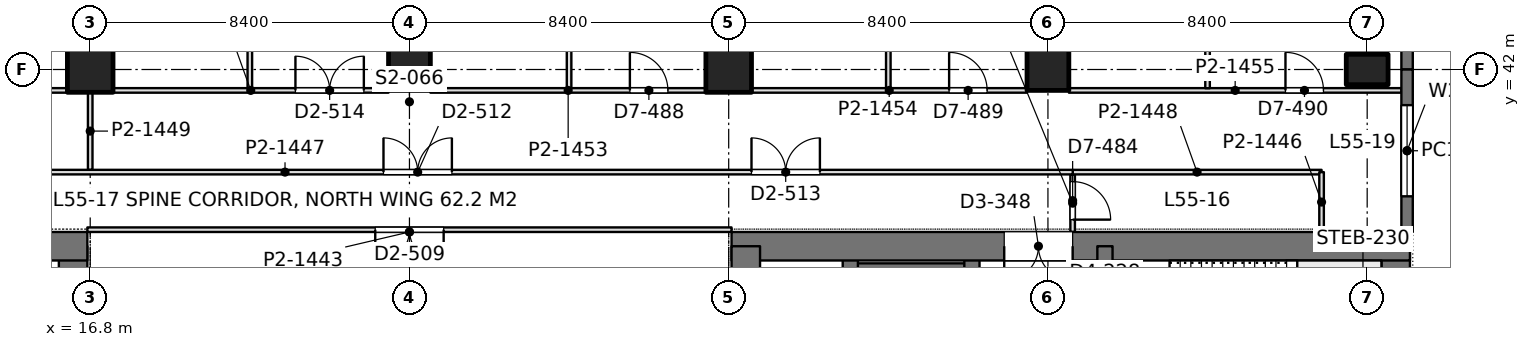
"""IFC4 building model, lengths in metres.
Left out: names, types, materials, properties, quantities, classifications, styles, units other than length and angle.
Written with IfcOpenShell. Run it as: python <this file> out.ifc"""

import sys

from ifc_helpers import new_model, si_unit, direction, frame, frame_2d, origin, origin_2d, place, context, subcontext, project, spatial, rectangle, extrude, element, fill, save


model = new_model("IFC4")
c1 = context("Model", 3, precision=1e-05, world=origin(), true_north=direction((0.0, 1.0)))
c2 = subcontext(c1, "Body", "Model", "MODEL_VIEW")
j1 = project(units=[si_unit("LENGTHUNIT", "METRE"), si_unit("PLANEANGLEUNIT", "RADIAN")], contexts=[c1])
p1 = place(None, origin())
s1 = spatial("IfcSite", under=j1, at=p1, CompositionType="ELEMENT")
p2 = place(p1, origin())
s2 = spatial("IfcBuilding", under=s1, at=p2, CompositionType="ELEMENT")
p3 = place(p2, frame((0.0, 0.0, 240.6)))
s3 = spatial("IfcBuildingStorey", under=s2, at=p3, CompositionType="ELEMENT", Elevation=240.6)
p4 = place(p3, frame((16.8, 42.0, 0.0), z_axis=(0.0, 0.0, 1.0), x_axis=(1.0, 0.0, 0.0)))
e1 = element("IfcColumn", 1, at=p4, inside=s3, PredefinedType="COLUMN", context=c2, shape_type="SweptSolid", body=[
    extrude(rectangle(XDim=1.2, YDim=1.2, at=origin_2d()), origin(), (0.0, 0.0, 1.0), 4.2),
])
p5 = place(p3, frame((25.2, 42.0, 0.0), z_axis=(0.0, 0.0, 1.0), x_axis=(1.0, 0.0, 0.0)))
e2 = element("IfcColumn", 2, at=p5, inside=s3, PredefinedType="COLUMN", context=c2, shape_type="SweptSolid", body=[
    extrude(rectangle(XDim=1.1, YDim=1.1, at=origin_2d()), origin(), (0.0, 0.0, 1.0), 4.2),
])
p6 = place(p3, frame((33.6, 42.0, 0.0), z_axis=(0.0, 0.0, 1.0), x_axis=(1.0, 0.0, 0.0)))
e3 = element("IfcColumn", 3, at=p6, inside=s3, PredefinedType="COLUMN", context=c2, shape_type="SweptSolid", body=[
    extrude(rectangle(XDim=1.2, YDim=1.2, at=origin_2d()), origin(), (0.0, 0.0, 1.0), 4.2),
])
p7 = place(p3, frame((42.0, 42.0, 0.0), z_axis=(0.0, 0.0, 1.0), x_axis=(1.0, 0.0, 0.0)))
e4 = element("IfcColumn", 4, at=p7, inside=s3, PredefinedType="COLUMN", context=c2, shape_type="SweptSolid", body=[
    extrude(rectangle(XDim=1.1, YDim=1.1, at=origin_2d()), origin(), (0.0, 0.0, 1.0), 4.2),
])
p8 = place(p3, frame((50.4, 42.0, 0.0), z_axis=(0.0, 0.0, 1.0), x_axis=(0.0, 1.0, 0.0)))
e5 = element("IfcColumn", 5, at=p8, inside=s3, PredefinedType="COLUMN", context=c2, shape_type="SweptSolid", body=[
    extrude(rectangle(XDim=0.8, YDim=1.1, at=origin_2d()), origin(), (0.0, 0.0, 1.0), 4.2),
])
p9 = place(p3, frame((-1.125, 37.35, 0.0), z_axis=(0.0, 0.0, 1.0), x_axis=(1.0, 0.0, 0.0)))
e6 = element("IfcWall", 6, at=p9, inside=s3, PredefinedType="SHEAR", context=c2, shape_type="SweptSolid", body=[
    extrude(rectangle(XDim=17.85, YDim=0.75, at=frame_2d((8.925, 0.0))), origin(), (0.0, 0.0, 1.0), 4.2),
])
p10 = place(p9, frame((8.875, 0.0, 0.0)))
e7 = element("IfcOpeningElement", 7, at=p10, cuts=e6, PredefinedType="OPENING", context=c2, shape_type="SweptSolid", body=[
    extrude(rectangle(XDim=1.8, YDim=2.4, at=frame_2d((0.9, 1.2))), frame((0.0, 0.385, 0.0), z_axis=(0.0, -1.0, 0.0), x_axis=(1.0, 0.0, 0.0)), (0.0, 0.0, 1.0), 0.77),
])
p11 = place(p3, frame((16.35, 27.8, 0.0), z_axis=(0.0, 0.0, 1.0), x_axis=(0.0, 1.0, 0.0)))
e8 = element("IfcWall", 8, at=p11, inside=s3, PredefinedType="SHEAR", context=c2, shape_type="SweptSolid", body=[
    extrude(rectangle(XDim=9.55, YDim=0.75, at=frame_2d((4.775, 0.0))), origin(), (0.0, 0.0, 1.0), 4.2),
])
p12 = place(p3, frame((33.675, 37.35, 0.0), z_axis=(0.0, 0.0, 1.0), x_axis=(1.0, 0.0, 0.0)))
e9 = element("IfcWall", 9, at=p12, inside=s3, PredefinedType="SHEAR", context=c2, shape_type="SweptSolid", body=[
    extrude(rectangle(XDim=17.85, YDim=0.75, at=frame_2d((8.925, 0.0))), origin(), (0.0, 0.0, 1.0), 4.2),
])
p13 = place(p12, frame((7.175, 0.0, 0.0)))
e10 = element("IfcOpeningElement", 10, at=p13, cuts=e9, PredefinedType="OPENING", context=c2, shape_type="SweptSolid", body=[
    extrude(rectangle(XDim=1.8, YDim=2.4, at=frame_2d((0.9, 1.2))), frame((0.0, 0.385, 0.0), z_axis=(0.0, -1.0, 0.0), x_axis=(1.0, 0.0, 0.0)), (0.0, 0.0, 1.0), 0.77),
])
p14 = place(p3, frame((34.05, 27.8, 0.0), z_axis=(0.0, 0.0, 1.0), x_axis=(0.0, 1.0, 0.0)))
e11 = element("IfcWall", 11, at=p14, inside=s3, PredefinedType="SHEAR", context=c2, shape_type="SweptSolid", body=[
    extrude(rectangle(XDim=9.55, YDim=0.75, at=frame_2d((4.775, 0.0))), origin(), (0.0, 0.0, 1.0), 4.2),
])
p15 = place(p3, frame((51.15, 13.05, 0.0), z_axis=(0.0, 0.0, 1.0), x_axis=(0.0, 1.0, 0.0)))
e12 = element("IfcWall", 12, at=p15, inside=s3, PredefinedType="SHEAR", context=c2, shape_type="SweptSolid", body=[
    extrude(rectangle(XDim=24.3, YDim=0.75, at=frame_2d((12.15, 0.0))), origin(), (0.0, 0.0, 1.0), 4.2),
])
p16 = place(p3, frame((43.5, 13.05, 0.0), z_axis=(0.0, 0.0, 1.0), x_axis=(0.0, 1.0, 0.0)))
e13 = element("IfcWall", 13, at=p16, inside=s3, PredefinedType="SHEAR", context=c2, shape_type="SweptSolid", body=[
    extrude(rectangle(XDim=24.3, YDim=0.4, at=frame_2d((12.15, 0.0))), origin(), (0.0, 0.0, 1.0), 4.2),
])
p17 = place(p16, frame((1.3, 0.0, 0.0)))
e14 = element("IfcOpeningElement", 14, at=p17, cuts=e13, PredefinedType="OPENING", context=c2, shape_type="SweptSolid", body=[
    extrude(rectangle(XDim=1.0, YDim=2.2, at=frame_2d((0.5, 1.1))), frame((0.0, 0.21, 0.0), z_axis=(0.0, -1.0, 0.0), x_axis=(1.0, 0.0, 0.0)), (0.0, 0.0, 1.0), 0.42),
])
p18 = place(p16, frame((22.0, 0.0, 0.0)))
e15 = element("IfcOpeningElement", 15, at=p18, cuts=e13, PredefinedType="OPENING", context=c2, shape_type="SweptSolid", body=[
    extrude(rectangle(XDim=1.0, YDim=2.2, at=frame_2d((0.5, 1.1))), frame((0.0, 0.21, 0.0), z_axis=(0.0, -1.0, 0.0), x_axis=(1.0, 0.0, 0.0)), (0.0, 0.0, 1.0), 0.42),
])
p19 = place(p16, frame((5.55, 0.0, 0.0)))
e16 = element("IfcOpeningElement", 16, at=p19, cuts=e13, PredefinedType="OPENING", context=c2, shape_type="SweptSolid", body=[
    extrude(rectangle(XDim=1.0, YDim=2.2, at=frame_2d((0.5, 1.1))), frame((0.0, 0.21, 0.0), z_axis=(0.0, -1.0, 0.0), x_axis=(1.0, 0.0, 0.0)), (0.0, 0.0, 1.0), 0.42),
])
p20 = place(p16, frame((9.55, 0.0, 0.0)))
e17 = element("IfcOpeningElement", 17, at=p20, cuts=e13, PredefinedType="OPENING", context=c2, shape_type="SweptSolid", body=[
    extrude(rectangle(XDim=1.0, YDim=2.2, at=frame_2d((0.5, 1.1))), frame((0.0, 0.21, 0.0), z_axis=(0.0, -1.0, 0.0), x_axis=(1.0, 0.0, 0.0)), (0.0, 0.0, 1.0), 0.42),
])
p21 = place(p16, frame((12.8, 0.0, 0.0)))
e18 = element("IfcOpeningElement", 18, at=p21, cuts=e13, PredefinedType="OPENING", context=c2, shape_type="SweptSolid", body=[
    extrude(rectangle(XDim=1.1, YDim=2.2, at=frame_2d((0.55, 1.1))), frame((0.0, 0.21, 0.0), z_axis=(0.0, -1.0, 0.0), x_axis=(1.0, 0.0, 0.0)), (0.0, 0.0, 1.0), 0.42),
])
p22 = place(p16, frame((15.538, 0.0, 0.0)))
e19 = element("IfcOpeningElement", 19, at=p22, cuts=e13, PredefinedType="OPENING", context=c2, shape_type="SweptSolid", body=[
    extrude(rectangle(XDim=1.1, YDim=2.2, at=frame_2d((0.55, 1.1))), frame((0.0, 0.21, 0.0), z_axis=(0.0, -1.0, 0.0), x_axis=(1.0, 0.0, 0.0)), (0.0, 0.0, 1.0), 0.42),
])
p23 = place(p16, frame((18.262, 0.0, 0.0)))
e20 = element("IfcOpeningElement", 20, at=p23, cuts=e13, PredefinedType="OPENING", context=c2, shape_type="SweptSolid", body=[
    extrude(rectangle(XDim=1.1, YDim=2.2, at=frame_2d((0.55, 1.1))), frame((0.0, 0.21, 0.0), z_axis=(0.0, -1.0, 0.0), x_axis=(1.0, 0.0, 0.0)), (0.0, 0.0, 1.0), 0.42),
])
p24 = place(p3, frame((40.0, 13.05, 0.0), z_axis=(0.0, 0.0, 1.0), x_axis=(0.0, 1.0, 0.0)))
e21 = element("IfcWall", 21, at=p24, inside=s3, PredefinedType="SHEAR", context=c2, shape_type="SweptSolid", body=[
    extrude(rectangle(XDim=24.3, YDim=0.4, at=frame_2d((12.15, 0.0))), origin(), (0.0, 0.0, 1.0), 4.2),
])
p25 = place(p24, frame((15.75, 0.0, 0.0)))
e22 = element("IfcOpeningElement", 22, at=p25, cuts=e21, PredefinedType="OPENING", context=c2, shape_type="SweptSolid", body=[
    extrude(rectangle(XDim=1.1, YDim=2.2, at=frame_2d((0.55, 1.1))), frame((0.0, 0.21, 0.0), z_axis=(0.0, -1.0, 0.0), x_axis=(1.0, 0.0, 0.0)), (0.0, 0.0, 1.0), 0.42),
])
p26 = place(p24, frame((18.6, 0.0, 0.0)))
e23 = element("IfcOpeningElement", 23, at=p26, cuts=e21, PredefinedType="OPENING", context=c2, shape_type="SweptSolid", body=[
    extrude(rectangle(XDim=1.1, YDim=2.2, at=frame_2d((0.55, 1.1))), frame((0.0, 0.21, 0.0), z_axis=(0.0, -1.0, 0.0), x_axis=(1.0, 0.0, 0.0)), (0.0, 0.0, 1.0), 0.42),
])
p27 = place(p24, frame((21.45, 0.0, 0.0)))
e24 = element("IfcOpeningElement", 24, at=p27, cuts=e21, PredefinedType="OPENING", context=c2, shape_type="SweptSolid", body=[
    extrude(rectangle(XDim=1.1, YDim=2.2, at=frame_2d((0.55, 1.1))), frame((0.0, 0.21, 0.0), z_axis=(0.0, -1.0, 0.0), x_axis=(1.0, 0.0, 0.0)), (0.0, 0.0, 1.0), 0.42),
])
p28 = place(p24, frame((8.65, 0.0, 0.0)))
e25 = element("IfcOpeningElement", 25, at=p28, cuts=e21, PredefinedType="OPENING", context=c2, shape_type="SweptSolid", body=[
    extrude(rectangle(XDim=1.8, YDim=2.4, at=frame_2d((0.9, 1.2))), frame((0.0, 0.21, 0.0), z_axis=(0.0, -1.0, 0.0), x_axis=(1.0, 0.0, 0.0)), (0.0, 0.0, 1.0), 0.42),
])
p29 = place(p3, frame((36.8, 27.925, 0.0), z_axis=(0.0, 0.0, 1.0), x_axis=(0.0, 1.0, 0.0)))
e26 = element("IfcWall", 26, at=p29, inside=s3, PredefinedType="SHEAR", context=c2, shape_type="SweptSolid", body=[
    extrude(rectangle(XDim=9.425, YDim=0.4, at=frame_2d((4.712, 0.0))), origin(), (0.0, 0.0, 1.0), 4.2),
])
p30 = place(p3, frame((40.0, 36.625, 0.0), z_axis=(0.0, 0.0, 1.0), x_axis=(-1.0, 0.0, 0.0)))
e27 = element("IfcWall", 27, at=p30, inside=s3, PredefinedType="SHEAR", context=c2, shape_type="SweptSolid", body=[
    extrude(rectangle(XDim=3.2, YDim=0.55, at=frame_2d((1.6, 0.0))), origin(), (0.0, 0.0, 1.0), 4.2),
])
p31 = place(p3, frame((51.45, 44.485, 0.0), z_axis=(0.0, 0.0, 1.0), x_axis=(0.0, -1.0, 0.0)))
e28 = element("IfcWall", 28, at=p31, inside=s3, PredefinedType="SOLIDWALL", context=c2, shape_type="SweptSolid", body=[
    extrude(rectangle(XDim=2.485, YDim=0.3, at=frame_2d((1.243, 0.0))), origin(), (0.0, 0.0, 1.0), 4.0),
])
p32 = place(p3, frame((51.45, 42.0, 0.0), z_axis=(0.0, 0.0, 1.0), x_axis=(0.0, -1.0, 0.0)))
e29 = element("IfcWall", 29, at=p32, inside=s3, PredefinedType="SOLIDWALL", context=c2, shape_type="SweptSolid", body=[
    extrude(rectangle(XDim=4.275, YDim=0.3, at=frame_2d((2.137, 0.0))), origin(), (0.0, 0.0, 1.0), 4.0),
])
p33 = place(p32, frame((0.938, 0.0, 0.9)))
e30 = element("IfcOpeningElement", 30, at=p33, cuts=e29, PredefinedType="OPENING", context=c2, shape_type="SweptSolid", body=[
    extrude(rectangle(XDim=2.4, YDim=1.9, at=frame_2d((1.2, 0.95))), frame((0.0, 0.16, 0.0), z_axis=(0.0, -1.0, 0.0), x_axis=(1.0, 0.0, 0.0)), (0.0, 0.0, 1.0), 0.32),
])
p34 = place(p3, frame((8.951, 41.45, 0.0), z_axis=(0.0, 0.0, 1.0), x_axis=(1.0, 0.0, 0.0)))
e31 = element("IfcWall", 31, at=p34, inside=s3, PredefinedType="PARTITIONING", context=c2, shape_type="SweptSolid", body=[
    extrude(rectangle(XDim=7.25, YDim=0.12, at=frame_2d((3.625, 0.0))), origin(), (0.0, 0.0, 1.0), 3.4),
])
p35 = place(p34, frame((5.249, 0.0, 0.0)))
e32 = element("IfcOpeningElement", 32, at=p35, cuts=e31, PredefinedType="OPENING", context=c2, shape_type="SweptSolid", body=[
    extrude(rectangle(XDim=1.0, YDim=2.4, at=frame_2d((0.5, 1.2))), frame((0.0, 0.07, 0.0), z_axis=(0.0, -1.0, 0.0), x_axis=(1.0, 0.0, 0.0)), (0.0, 0.0, 1.0), 0.14),
])
p36 = place(p3, frame((17.399, 41.45, 0.0), z_axis=(0.0, 0.0, 1.0), x_axis=(1.0, 0.0, 0.0)))
e33 = element("IfcWall", 33, at=p36, inside=s3, PredefinedType="PARTITIONING", context=c2, shape_type="SweptSolid", body=[
    extrude(rectangle(XDim=7.25, YDim=0.12, at=frame_2d((3.625, 0.0))), origin(), (0.0, 0.0, 1.0), 3.4),
])
p37 = place(p36, frame((4.801, 0.0, 0.0)))
e34 = element("IfcOpeningElement", 34, at=p37, cuts=e33, PredefinedType="OPENING", context=c2, shape_type="SweptSolid", body=[
    extrude(rectangle(XDim=1.8, YDim=2.2, at=frame_2d((0.9, 1.1))), frame((0.0, 0.07, 0.0), z_axis=(0.0, -1.0, 0.0), x_axis=(1.0, 0.0, 0.0)), (0.0, 0.0, 1.0), 0.14),
])
p38 = place(p3, frame((25.751, 41.45, 0.0), z_axis=(0.0, 0.0, 1.0), x_axis=(1.0, 0.0, 0.0)))
e35 = element("IfcWall", 35, at=p38, inside=s3, PredefinedType="PARTITIONING", context=c2, shape_type="SweptSolid", body=[
    extrude(rectangle(XDim=7.25, YDim=0.12, at=frame_2d((3.625, 0.0))), origin(), (0.0, 0.0, 1.0), 3.4),
])
p39 = place(p38, frame((5.249, 0.0, 0.0)))
e36 = element("IfcOpeningElement", 36, at=p39, cuts=e35, PredefinedType="OPENING", context=c2, shape_type="SweptSolid", body=[
    extrude(rectangle(XDim=1.0, YDim=2.4, at=frame_2d((0.5, 1.2))), frame((0.0, 0.07, 0.0), z_axis=(0.0, -1.0, 0.0), x_axis=(1.0, 0.0, 0.0)), (0.0, 0.0, 1.0), 0.14),
])
p40 = place(p3, frame((34.199, 41.45, 0.0), z_axis=(0.0, 0.0, 1.0), x_axis=(1.0, 0.0, 0.0)))
e37 = element("IfcWall", 37, at=p40, inside=s3, PredefinedType="PARTITIONING", context=c2, shape_type="SweptSolid", body=[
    extrude(rectangle(XDim=7.25, YDim=0.12, at=frame_2d((3.625, 0.0))), origin(), (0.0, 0.0, 1.0), 3.4),
])
p41 = place(p40, frame((5.201, 0.0, 0.0)))
e38 = element("IfcOpeningElement", 38, at=p41, cuts=e37, PredefinedType="OPENING", context=c2, shape_type="SweptSolid", body=[
    extrude(rectangle(XDim=1.0, YDim=2.4, at=frame_2d((0.5, 1.2))), frame((0.0, 0.07, 0.0), z_axis=(0.0, -1.0, 0.0), x_axis=(1.0, 0.0, 0.0)), (0.0, 0.0, 1.0), 0.14),
])
p42 = place(p3, frame((42.551, 41.45, 0.0), z_axis=(0.0, 0.0, 1.0), x_axis=(1.0, 0.0, 0.0)))
e39 = element("IfcWall", 39, at=p42, inside=s3, PredefinedType="PARTITIONING", context=c2, shape_type="SweptSolid", body=[
    extrude(rectangle(XDim=8.751, YDim=0.12, at=frame_2d((4.375, 0.0))), origin(), (0.0, 0.0, 1.0), 3.4),
])
p43 = place(p42, frame((5.699, 0.0, 0.0)))
e40 = element("IfcOpeningElement", 40, at=p43, cuts=e39, PredefinedType="OPENING", context=c2, shape_type="SweptSolid", body=[
    extrude(rectangle(XDim=1.0, YDim=2.4, at=frame_2d((0.5, 1.2))), frame((0.0, 0.07, 0.0), z_axis=(0.0, -1.0, 0.0), x_axis=(1.0, 0.0, 0.0)), (0.0, 0.0, 1.0), 0.14),
])
for number, where, z_axis, x_axis in (
    (41, (21.0, 41.508, 0.0), (0.0, 0.0, 1.0), (0.0, 1.0, 0.0)),
    (42, (29.4, 41.508, 0.0), (0.0, 0.0, 1.0), (0.0, 1.0, 0.0)),
    (43, (37.8, 41.508, 0.0), (0.0, 0.0, 1.0), (0.0, 1.0, 0.0)),
    (44, (46.2, 41.508, 0.0), (0.0, 0.0, 1.0), (0.0, 1.0, 0.0)),
):
    element("IfcWall", number, at=place(p3, frame(where, z_axis=z_axis, x_axis=x_axis)), inside=s3, PredefinedType="PARTITIONING", context=c2, shape_type="SweptSolid", body=[
        extrude(rectangle(XDim=4.194, YDim=0.12, at=frame_2d((2.097, 0.0))), origin(), (0.0, 0.0, 1.0), 3.3),
    ])
p44 = place(p3, frame((16.8, 39.358, 0.0), z_axis=(0.0, 0.0, 1.0), x_axis=(0.0, 1.0, 0.0)))
e45 = element("IfcWall", 45, at=p44, inside=s3, PredefinedType="PARTITIONING", context=c2, shape_type="SweptSolid", body=[
    extrude(rectangle(XDim=2.043, YDim=0.12, at=frame_2d((1.021, 0.0))), origin(), (0.0, 0.0, 1.0), 3.543),
])
p45 = place(p3, frame((1.2, 39.3, 0.0), z_axis=(0.0, 0.0, 1.0), x_axis=(1.0, 0.0, 0.0)))
e46 = element("IfcWall", 46, at=p45, inside=s3, PredefinedType="PARTITIONING", context=c2, shape_type="SweptSolid", body=[
    extrude(rectangle(XDim=41.452, YDim=0.12, at=frame_2d((20.726, 0.0))), origin(), (0.0, 0.0, 1.0), 3.3),
])
p46 = place(p45, frame((4.3, 0.0, 0.0)))
e47 = element("IfcOpeningElement", 47, at=p46, cuts=e46, PredefinedType="OPENING", context=c2, shape_type="SweptSolid", body=[
    extrude(rectangle(XDim=1.8, YDim=2.2, at=frame_2d((0.9, 1.1))), frame((0.0, 0.07, 0.0), z_axis=(0.0, -1.0, 0.0), x_axis=(1.0, 0.0, 0.0)), (0.0, 0.0, 1.0), 0.14),
])
p47 = place(p45, frame((9.5, 0.0, 0.0)))
e48 = element("IfcOpeningElement", 48, at=p47, cuts=e46, PredefinedType="OPENING", context=c2, shape_type="SweptSolid", body=[
    extrude(rectangle(XDim=1.8, YDim=2.2, at=frame_2d((0.9, 1.1))), frame((0.0, 0.07, 0.0), z_axis=(0.0, -1.0, 0.0), x_axis=(1.0, 0.0, 0.0)), (0.0, 0.0, 1.0), 0.14),
])
p48 = place(p45, frame((23.317, 0.0, 0.0)))
e49 = element("IfcOpeningElement", 49, at=p48, cuts=e46, PredefinedType="OPENING", context=c2, shape_type="SweptSolid", body=[
    extrude(rectangle(XDim=1.8, YDim=2.2, at=frame_2d((0.9, 1.1))), frame((0.0, 0.07, 0.0), z_axis=(0.0, -1.0, 0.0), x_axis=(1.0, 0.0, 0.0)), (0.0, 0.0, 1.0), 0.14),
])
p49 = place(p45, frame((33.0, 0.0, 0.0)))
e50 = element("IfcOpeningElement", 50, at=p49, cuts=e46, PredefinedType="OPENING", context=c2, shape_type="SweptSolid", body=[
    extrude(rectangle(XDim=1.8, YDim=2.2, at=frame_2d((0.9, 1.1))), frame((0.0, 0.07, 0.0), z_axis=(0.0, -1.0, 0.0), x_axis=(1.0, 0.0, 0.0)), (0.0, 0.0, 1.0), 0.14),
])
p50 = place(p3, frame((42.65, 37.724, 0.0), z_axis=(0.0, 0.0, 1.0), x_axis=(0.0, 1.0, 0.0)))
e51 = element("IfcWall", 51, at=p50, inside=s3, PredefinedType="PARTITIONING", context=c2, shape_type="SweptSolid", body=[
    extrude(rectangle(XDim=1.518, YDim=0.12, at=frame_2d((0.759, 0.0))), origin(), (0.0, 0.0, 1.0), 4.0),
])
p51 = place(p50, frame((0.326, 0.0, 0.0)))
e52 = element("IfcOpeningElement", 52, at=p51, cuts=e51, PredefinedType="OPENING", context=c2, shape_type="SweptSolid", body=[
    extrude(rectangle(XDim=1.0, YDim=2.4, at=frame_2d((0.5, 1.2))), frame((0.0, 0.07, 0.0), z_axis=(0.0, -1.0, 0.0), x_axis=(1.0, 0.0, 0.0)), (0.0, 0.0, 1.0), 0.14),
])
p52 = place(p3, frame((42.648, 39.3, 0.0), z_axis=(0.0, 0.0, 1.0), x_axis=(1.0, 0.0, 0.0)))
e53 = element("IfcWall", 53, at=p52, inside=s3, PredefinedType="PARTITIONING", context=c2, shape_type="SweptSolid", body=[
    extrude(rectangle(XDim=6.552, YDim=0.12, at=frame_2d((3.276, 0.0))), origin(), (0.0, 0.0, 1.0), 3.4),
])
p53 = place(p3, frame((49.2, 37.724, 0.0), z_axis=(0.0, 0.0, 1.0), x_axis=(0.0, 1.0, 0.0)))
e54 = element("IfcWall", 54, at=p53, inside=s3, PredefinedType="PARTITIONING", context=c2, shape_type="SweptSolid", body=[
    extrude(rectangle(XDim=1.576, YDim=0.12, at=frame_2d((0.788, 0.0))), origin(), (0.0, 0.0, 1.0), 4.0),
])
p54 = place(p3, frame((16.725, 37.785, 0.0), z_axis=(0.0, 0.0, 1.0), x_axis=(1.0, 0.0, 0.0)))
e55 = element("IfcWall", 55, at=p54, inside=s3, PredefinedType="PARTITIONING", context=c2, shape_type="SweptSolid", body=[
    extrude(rectangle(XDim=16.95, YDim=0.12, at=frame_2d((8.475, 0.0))), origin(), (0.0, 0.0, 1.0), 3.3),
])
p55 = place(p54, frame((7.575, 0.0, 0.0)))
e56 = element("IfcOpeningElement", 56, at=p55, cuts=e55, PredefinedType="OPENING", context=c2, shape_type="SweptSolid", body=[
    extrude(rectangle(XDim=1.8, YDim=2.2, at=frame_2d((0.9, 1.1))), frame((0.0, 0.07, 0.0), z_axis=(0.0, -1.0, 0.0), x_axis=(1.0, 0.0, 0.0)), (0.0, 0.0, 1.0), 0.14),
])
p56 = place(p33, origin())
e57 = element("IfcWindow", 57, at=p56, inside=s3, PartitioningType="SINGLE_PANEL", PredefinedType="WINDOW", context=c2, shape_type="SweptSolid", body=[
    extrude(rectangle(XDim=2.4, YDim=1.9, at=frame_2d((1.2, 0.95))), frame((0.0, 0.03, 0.0), z_axis=(0.0, -1.0, 0.0), x_axis=(1.0, 0.0, 0.0)), (0.0, 0.0, 1.0), 0.06),
])
fill(e30, e57)
p57 = place(p13, frame((1.8, 0.0, 0.0), z_axis=(0.0, 0.0, 1.0), x_axis=(-1.0, 0.0, 0.0)))
e58 = element("IfcDoor", 58, at=p57, inside=s3, OperationType="DOUBLE_DOOR_SINGLE_SWING", PredefinedType="DOOR", context=c2, shape_type="SweptSolid", body=[
    extrude(rectangle(XDim=1.8, YDim=2.4, at=frame_2d((0.9, 1.2))), frame((0.0, 0.025, 0.0), z_axis=(0.0, -1.0, 0.0), x_axis=(1.0, 0.0, 0.0)), (0.0, 0.0, 1.0), 0.05),
])
fill(e10, e58)
p58 = place(p37, origin())
e59 = element("IfcDoor", 59, at=p58, inside=s3, OperationType="DOUBLE_DOOR_SINGLE_SWING", PredefinedType="DOOR", context=c2, shape_type="SweptSolid", body=[
    extrude(rectangle(XDim=1.8, YDim=2.2, at=frame_2d((0.9, 1.1))), frame((0.0, 0.025, 0.0), z_axis=(0.0, -1.0, 0.0), x_axis=(1.0, 0.0, 0.0)), (0.0, 0.0, 1.0), 0.05),
])
fill(e34, e59)
p59 = place(p39, origin())
e60 = element("IfcDoor", 60, at=p59, inside=s3, OperationType="SINGLE_SWING_LEFT", PredefinedType="DOOR", context=c2, shape_type="SweptSolid", body=[
    extrude(rectangle(XDim=1.0, YDim=2.4, at=frame_2d((0.5, 1.2))), frame((0.0, 0.025, 0.0), z_axis=(0.0, -1.0, 0.0), x_axis=(1.0, 0.0, 0.0)), (0.0, 0.0, 1.0), 0.05),
])
fill(e36, e60)
p60 = place(p41, origin())
e61 = element("IfcDoor", 61, at=p60, inside=s3, OperationType="SINGLE_SWING_LEFT", PredefinedType="DOOR", context=c2, shape_type="SweptSolid", body=[
    extrude(rectangle(XDim=1.0, YDim=2.4, at=frame_2d((0.5, 1.2))), frame((0.0, 0.025, 0.0), z_axis=(0.0, -1.0, 0.0), x_axis=(1.0, 0.0, 0.0)), (0.0, 0.0, 1.0), 0.05),
])
fill(e38, e61)
p61 = place(p43, origin())
e62 = element("IfcDoor", 62, at=p61, inside=s3, OperationType="SINGLE_SWING_LEFT", PredefinedType="DOOR", context=c2, shape_type="SweptSolid", body=[
    extrude(rectangle(XDim=1.0, YDim=2.4, at=frame_2d((0.5, 1.2))), frame((0.0, 0.025, 0.0), z_axis=(0.0, -1.0, 0.0), x_axis=(1.0, 0.0, 0.0)), (0.0, 0.0, 1.0), 0.05),
])
fill(e40, e62)
p62 = place(p48, origin())
e63 = element("IfcDoor", 63, at=p62, inside=s3, OperationType="DOUBLE_DOOR_SINGLE_SWING", PredefinedType="DOOR", context=c2, shape_type="SweptSolid", body=[
    extrude(rectangle(XDim=1.8, YDim=2.2, at=frame_2d((0.9, 1.1))), frame((0.0, 0.025, 0.0), z_axis=(0.0, -1.0, 0.0), x_axis=(1.0, 0.0, 0.0)), (0.0, 0.0, 1.0), 0.05),
])
fill(e49, e63)
p63 = place(p49, origin())
e64 = element("IfcDoor", 64, at=p63, inside=s3, OperationType="DOUBLE_DOOR_SINGLE_SWING", PredefinedType="DOOR", context=c2, shape_type="SweptSolid", body=[
    extrude(rectangle(XDim=1.8, YDim=2.2, at=frame_2d((0.9, 1.1))), frame((0.0, 0.025, 0.0), z_axis=(0.0, -1.0, 0.0), x_axis=(1.0, 0.0, 0.0)), (0.0, 0.0, 1.0), 0.05),
])
fill(e50, e64)
p64 = place(p51, frame((1.0, 0.0, 0.0), z_axis=(0.0, 0.0, 1.0), x_axis=(-1.0, 0.0, 0.0)))
e65 = element("IfcDoor", 65, at=p64, inside=s3, OperationType="SINGLE_SWING_RIGHT", PredefinedType="DOOR", context=c2, shape_type="SweptSolid", body=[
    extrude(rectangle(XDim=1.0, YDim=2.4, at=frame_2d((0.5, 1.2))), frame((0.0, 0.025, 0.0), z_axis=(0.0, -1.0, 0.0), x_axis=(1.0, 0.0, 0.0)), (0.0, 0.0, 1.0), 0.05),
])
fill(e52, e65)
p65 = place(p55, frame((1.8, 0.0, 0.0), z_axis=(0.0, 0.0, 1.0), x_axis=(-1.0, 0.0, 0.0)))
e66 = element("IfcDoor", 66, at=p65, inside=s3, OperationType="DOUBLE_DOOR_SINGLE_SWING", PredefinedType="DOOR", context=c2, shape_type="SweptSolid", body=[
    extrude(rectangle(XDim=1.8, YDim=2.2, at=frame_2d((0.9, 1.1))), frame((0.0, 0.025, 0.0), z_axis=(0.0, -1.0, 0.0), x_axis=(1.0, 0.0, 0.0)), (0.0, 0.0, 1.0), 0.05),
])
fill(e56, e66)
save(model, sys.argv[1])
